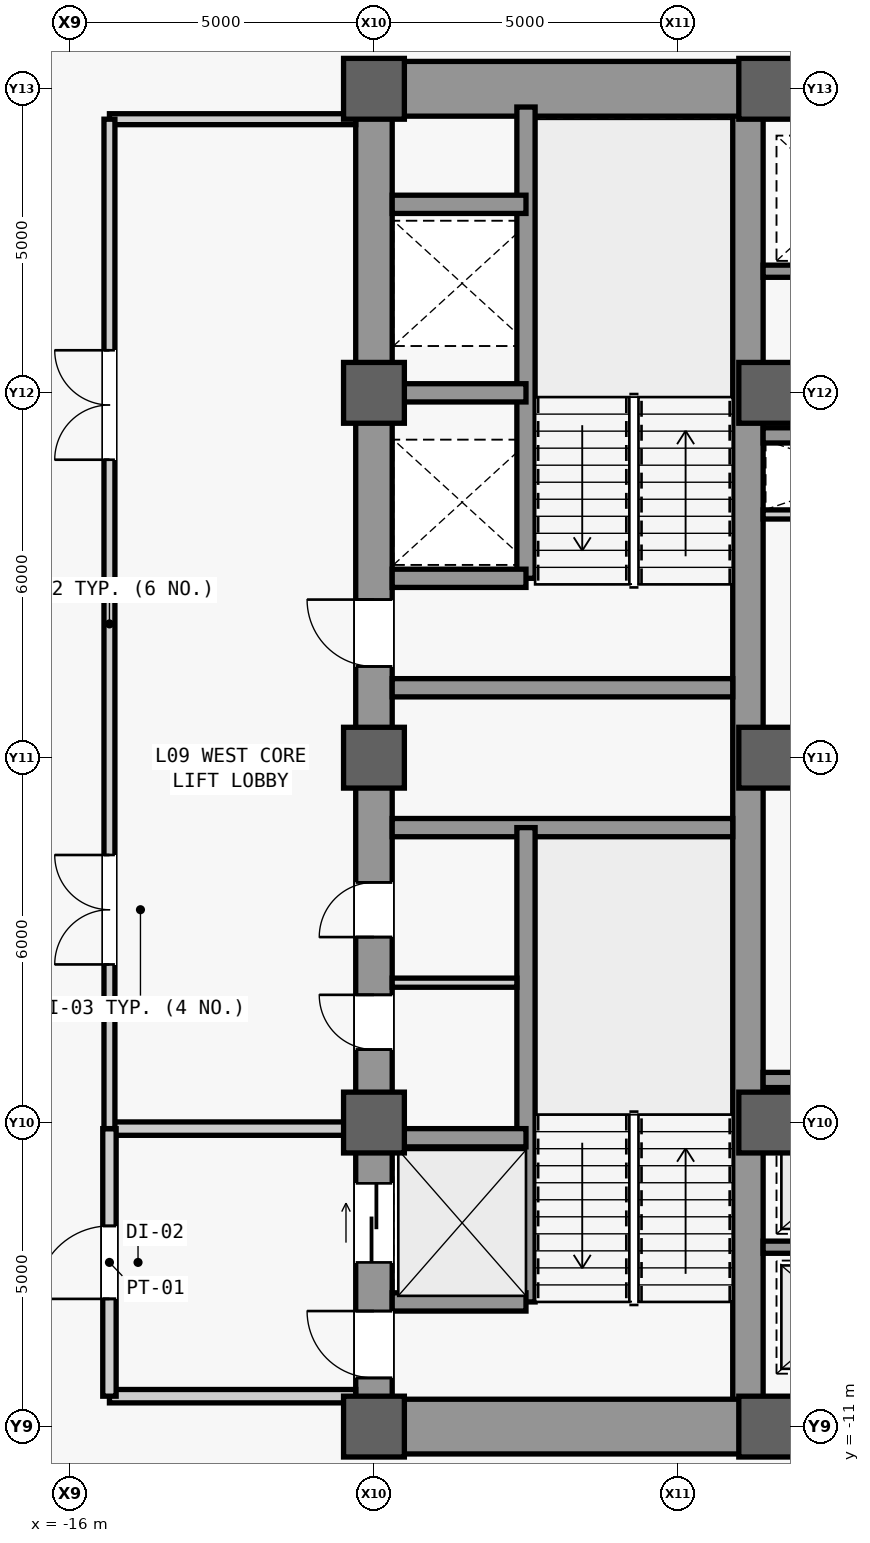
"""IFC4 building model, lengths in metres.
Left out: names, types, materials, properties, quantities, classifications, styles, units other than length and angle.
Written with IfcOpenShell. Run it as: python <this file> out.ifc"""

import sys

from ifc_helpers import new_model, si_unit, direction, frame, frame_2d, origin, origin_2d, place, context, subcontext, project, spatial, rectangle, extrude, source, transform, mapped, element, fill, save


model = new_model("IFC4")
c1 = context("Model", 3, precision=1e-05, world=origin(), true_north=direction((0.0, 1.0)))
c2 = subcontext(c1, "Body", "Model", "MODEL_VIEW")
j1 = project(units=[si_unit("LENGTHUNIT", "METRE"), si_unit("PLANEANGLEUNIT", "RADIAN")], contexts=[c1])
p1 = place(None, origin())
s1 = spatial("IfcSite", under=j1, at=p1, CompositionType="ELEMENT")
p2 = place(p1, origin())
s2 = spatial("IfcBuilding", under=s1, at=p2, CompositionType="ELEMENT")
p3 = place(p2, frame((0.0, 0.0, 45.2)))
s3 = spatial("IfcBuildingStorey", under=s2, at=p3, CompositionType="ELEMENT", Elevation=45.2)
m1 = source(origin(), c2, "Body", "SweptSolid", [
    extrude(rectangle(XDim=22.0, YDim=0.6, at=frame_2d((11.0, 0.0))), origin(), (0.0, 0.0, 1.0), 3.94),
])
p4 = place(p3, frame((-11.0, -11.0, 0.0), z_axis=(0.0, 0.0, 1.0), x_axis=(0.0, 1.0, 0.0)))
e1 = element("IfcWall", 1, at=p4, inside=s3, PredefinedType="SHEAR", context=c2, shape_type="MappedRepresentation", body=[
    mapped(m1, transform((0.0, 0.0, 0.0), scale=1.0)),
])
m2 = source(origin(), c2, "Body", "SweptSolid", [
    extrude(rectangle(XDim=1.1, YDim=2.2, at=frame_2d((0.55, 1.1))), frame((0.0, 0.31, 0.0), z_axis=(0.0, -1.0, 0.0), x_axis=(1.0, 0.0, 0.0)), (0.0, 0.0, 1.0), 0.62),
])
p5 = place(p4, frame((0.8, 0.0, 0.0)))
e2 = element("IfcOpeningElement", 2, at=p5, cuts=e1, PredefinedType="OPENING", context=c2, shape_type="MappedRepresentation", body=[
    mapped(m2, transform((0.0, 0.0, 0.0), scale=1.0)),
])
p6 = place(p4, frame((12.5, 0.0, 0.0)))
e3 = element("IfcOpeningElement", 3, at=p6, cuts=e1, PredefinedType="OPENING", context=c2, shape_type="MappedRepresentation", body=[
    mapped(m2, transform((0.0, 0.0, 0.0), scale=1.0)),
])
m3 = source(origin(), c2, "Body", "SweptSolid", [
    extrude(rectangle(XDim=0.9, YDim=2.15, at=frame_2d((0.45, 1.075))), frame((0.0, 0.31, 0.0), z_axis=(0.0, -1.0, 0.0), x_axis=(1.0, 0.0, 0.0)), (0.0, 0.0, 1.0), 0.62),
])
p7 = place(p4, frame((6.2, 0.0, 0.0)))
e4 = element("IfcOpeningElement", 4, at=p7, cuts=e1, PredefinedType="OPENING", context=c2, shape_type="MappedRepresentation", body=[
    mapped(m3, transform((0.0, 0.0, 0.0), scale=1.0)),
])
p8 = place(p4, frame((8.05, 0.0, 0.0)))
e5 = element("IfcOpeningElement", 5, at=p8, cuts=e1, PredefinedType="OPENING", context=c2, shape_type="MappedRepresentation", body=[
    mapped(m3, transform((0.0, 0.0, 0.0), scale=1.0)),
])
m4 = source(origin(), c2, "Body", "SweptSolid", [
    extrude(rectangle(XDim=1.3, YDim=2.3, at=frame_2d((0.65, 1.15))), frame((0.0, 0.31, 0.0), z_axis=(0.0, -1.0, 0.0), x_axis=(1.0, 0.0, 0.0)), (0.0, 0.0, 1.0), 0.62),
])
p9 = place(p4, frame((2.7, 0.0, 0.0)))
e6 = element("IfcOpeningElement", 6, at=p9, cuts=e1, PredefinedType="OPENING", context=c2, shape_type="MappedRepresentation", body=[
    mapped(m4, transform((0.0, 0.0, 0.0), scale=1.0)),
])
m5 = source(origin(), c2, "Body", "SweptSolid", [
    extrude(rectangle(XDim=21.4, YDim=0.5, at=frame_2d((10.7, 0.0))), origin(), (0.0, 0.0, 1.0), 3.94),
])
p10 = place(p3, frame((-4.85, -10.7, 0.0), z_axis=(0.0, 0.0, 1.0), x_axis=(0.0, 1.0, 0.0)))
e7 = element("IfcWall", 7, at=p10, inside=s3, PredefinedType="SHEAR", context=c2, shape_type="MappedRepresentation", body=[
    mapped(m5, transform((0.0, 0.0, 0.0), scale=1.0)),
])
m6 = source(origin(), c2, "Body", "SweptSolid", [
    extrude(rectangle(XDim=5.85, YDim=0.9, at=frame_2d((2.925, 0.0))), origin(), (0.0, 0.0, 1.0), 3.94),
])
for number, where, z_axis, x_axis in (
    (8, (-10.7, -11.0, 0.0), (0.0, 0.0, 1.0), (1.0, 0.0, 0.0)),
    (9, (-10.7, 11.0, 0.0), (0.0, 0.0, 1.0), (1.0, 0.0, 0.0)),
):
    element("IfcWall", number, at=place(p3, frame(where, z_axis=z_axis, x_axis=x_axis)), inside=s3, PredefinedType="SHEAR", context=c2, shape_type="MappedRepresentation", body=[
        mapped(m6, transform((0.0, 0.0, 0.0), scale=1.0)),
    ])
m7 = source(origin(), c2, "Body", "SweptSolid", [
    extrude(rectangle(XDim=5.6, YDim=0.3, at=frame_2d((2.8, 0.0))), origin(), (0.0, 0.0, 1.0), 3.94),
])
for number, where, z_axis, x_axis in (
    (10, (-10.7, -1.15, 0.0), (0.0, 0.0, 1.0), (1.0, 0.0, 0.0)),
    (11, (-10.7, 1.15, 0.0), (0.0, 0.0, 1.0), (1.0, 0.0, 0.0)),
):
    element("IfcWall", number, at=place(p3, frame(where, z_axis=z_axis, x_axis=x_axis)), inside=s3, PredefinedType="SHEAR", context=c2, shape_type="MappedRepresentation", body=[
        mapped(m7, transform((0.0, 0.0, 0.0), scale=1.0)),
    ])
m8 = source(origin(), c2, "Body", "SweptSolid", [
    extrude(rectangle(XDim=9.2, YDim=0.5, at=frame_2d((4.6, 0.0))), origin(), (0.0, 0.0, 1.0), 3.94),
])
p11 = place(p3, frame((-4.6, -11.0, 0.0), z_axis=(0.0, 0.0, 1.0), x_axis=(1.0, 0.0, 0.0)))
e12 = element("IfcWall", 12, at=p11, inside=s3, PredefinedType="SHEAR", context=c2, shape_type="MappedRepresentation", body=[
    mapped(m8, transform((0.0, 0.0, 0.0), scale=1.0)),
])
m9 = source(origin(), c2, "Body", "SweptSolid", [
    extrude(rectangle(XDim=1.8, YDim=2.25, at=frame_2d((0.9, 1.125))), frame((0.0, 0.26, 0.0), z_axis=(0.0, -1.0, 0.0), x_axis=(1.0, 0.0, 0.0)), (0.0, 0.0, 1.0), 0.52),
])
p12 = place(p11, frame((3.7, 0.0, 0.0)))
e13 = element("IfcOpeningElement", 13, at=p12, cuts=e12, PredefinedType="OPENING", context=c2, shape_type="MappedRepresentation", body=[
    mapped(m9, transform((0.0, 0.0, 0.0), scale=1.0)),
])
p13 = place(p3, frame((-4.6, 11.0, 0.0), z_axis=(0.0, 0.0, 1.0), x_axis=(1.0, 0.0, 0.0)))
e14 = element("IfcWall", 14, at=p13, inside=s3, PredefinedType="SHEAR", context=c2, shape_type="MappedRepresentation", body=[
    mapped(m8, transform((0.0, 0.0, 0.0), scale=1.0)),
])
p14 = place(p13, frame((3.7, 0.0, 0.0)))
e15 = element("IfcOpeningElement", 15, at=p14, cuts=e14, PredefinedType="OPENING", context=c2, shape_type="MappedRepresentation", body=[
    mapped(m9, transform((0.0, 0.0, 0.0), scale=1.0)),
])
m10 = source(origin(), c2, "Body", "SweptSolid", [
    extrude(rectangle(XDim=1.0, YDim=1.0, at=origin_2d()), origin(), (0.0, 0.0, 1.0), 4.2),
])
for number, where, z_axis, x_axis in (
    (16, (-11.0, -11.0, 0.0), (0.0, 0.0, 1.0), (1.0, 0.0, 0.0)),
    (17, (-11.0, -6.0, 0.0), (0.0, 0.0, 1.0), (1.0, 0.0, 0.0)),
    (18, (-11.0, 0.0, 0.0), (0.0, 0.0, 1.0), (1.0, 0.0, 0.0)),
    (19, (-11.0, 6.0, 0.0), (0.0, 0.0, 1.0), (1.0, 0.0, 0.0)),
    (20, (-11.0, 11.0, 0.0), (0.0, 0.0, 1.0), (1.0, 0.0, 0.0)),
    (21, (-4.5, -11.0, 0.0), (0.0, 0.0, 1.0), (1.0, 0.0, 0.0)),
    (22, (-4.5, -6.0, 0.0), (0.0, 0.0, 1.0), (1.0, 0.0, 0.0)),
    (23, (-4.5, 0.0, 0.0), (0.0, 0.0, 1.0), (1.0, 0.0, 0.0)),
    (24, (-4.5, 6.0, 0.0), (0.0, 0.0, 1.0), (1.0, 0.0, 0.0)),
    (25, (-4.5, 11.0, 0.0), (0.0, 0.0, 1.0), (1.0, 0.0, 0.0)),
):
    element("IfcColumn", number, at=place(p3, frame(where, z_axis=z_axis, x_axis=x_axis)), inside=s3, PredefinedType="COLUMN", context=c2, shape_type="MappedRepresentation", body=[
        mapped(m10, transform((0.0, 0.0, 0.0), scale=1.0)),
    ])
m11 = source(origin(), c2, "Body", "SweptSolid", [
    extrude(rectangle(XDim=7.8, YDim=0.3, at=frame_2d((3.9, 0.0))), origin(), (0.0, 0.0, 1.0), 3.94),
])
p15 = place(p3, frame((-8.5, -8.95, 0.0), z_axis=(0.0, 0.0, 1.0), x_axis=(0.0, 1.0, 0.0)))
e26 = element("IfcWall", 26, at=p15, inside=s3, PredefinedType="SHEAR", context=c2, shape_type="MappedRepresentation", body=[
    mapped(m11, transform((0.0, 0.0, 0.0), scale=1.0)),
])
m12 = source(origin(), c2, "Body", "SweptSolid", [
    extrude(rectangle(XDim=2.2, YDim=0.3, at=frame_2d((1.1, 0.0))), origin(), (0.0, 0.0, 1.0), 3.94),
])
for number, where, z_axis, x_axis in (
    (27, (-10.7, -8.95, 0.0), (0.0, 0.0, 1.0), (1.0, 0.0, 0.0)),
    (28, (-10.7, -6.25, 0.0), (0.0, 0.0, 1.0), (1.0, 0.0, 0.0)),
):
    element("IfcWall", number, at=place(p3, frame(where, z_axis=z_axis, x_axis=x_axis)), inside=s3, PredefinedType="SHEAR", context=c2, shape_type="MappedRepresentation", body=[
        mapped(m12, transform((0.0, 0.0, 0.0), scale=1.0)),
    ])
m13 = source(origin(), c2, "Body", "SweptSolid", [
    extrude(rectangle(XDim=7.75, YDim=0.3, at=frame_2d((3.875, 0.0))), origin(), (0.0, 0.0, 1.0), 3.94),
])
p16 = place(p3, frame((-8.5, 2.95, 0.0), z_axis=(0.0, 0.0, 1.0), x_axis=(0.0, 1.0, 0.0)))
e29 = element("IfcWall", 29, at=p16, inside=s3, PredefinedType="SHEAR", context=c2, shape_type="MappedRepresentation", body=[
    mapped(m13, transform((0.0, 0.0, 0.0), scale=1.0)),
])
for number, where, z_axis, x_axis in (
    (30, (-10.7, 2.95, 0.0), (0.0, 0.0, 1.0), (1.0, 0.0, 0.0)),
    (31, (-10.7, 6.0, 0.0), (0.0, 0.0, 1.0), (1.0, 0.0, 0.0)),
    (32, (-10.7, 9.1, 0.0), (0.0, 0.0, 1.0), (1.0, 0.0, 0.0)),
):
    element("IfcWall", number, at=place(p3, frame(where, z_axis=z_axis, x_axis=x_axis)), inside=s3, PredefinedType="SHEAR", context=c2, shape_type="MappedRepresentation", body=[
        mapped(m12, transform((0.0, 0.0, 0.0), scale=1.0)),
    ])
m14 = source(origin(), c2, "Body", "SweptSolid", [
    extrude(rectangle(XDim=2.05, YDim=0.15, at=frame_2d((1.025, 0.0))), origin(), (0.0, 0.0, 1.0), 3.94),
])
p17 = place(p3, frame((-10.7, -3.7, 0.0), z_axis=(0.0, 0.0, 1.0), x_axis=(1.0, 0.0, 0.0)))
e33 = element("IfcWall", 33, at=p17, inside=s3, PredefinedType="PARTITIONING", context=c2, shape_type="MappedRepresentation", body=[
    mapped(m14, transform((0.0, 0.0, 0.0), scale=1.0)),
])
m15 = source(origin(), c2, "Body", "SweptSolid", [
    extrude(rectangle(XDim=4.05, YDim=0.22, at=frame_2d((2.025, 0.0))), origin(), (0.0, 0.0, 1.0), 3.94),
])
p18 = place(p3, frame((-15.35, -10.5, 0.0), z_axis=(0.0, 0.0, 1.0), x_axis=(1.0, 0.0, 0.0)))
e34 = element("IfcWall", 34, at=p18, inside=s3, PredefinedType="PARTITIONING", context=c2, shape_type="MappedRepresentation", body=[
    mapped(m15, transform((0.0, 0.0, 0.0), scale=1.0)),
])
m16 = source(origin(), c2, "Body", "SweptSolid", [
    extrude(rectangle(XDim=4.05, YDim=0.22, at=frame_2d((2.025, 0.0))), origin(), (0.0, 0.0, 1.0), 3.085),
])
p19 = place(p3, frame((-15.35, -6.1, 0.0), z_axis=(0.0, 0.0, 1.0), x_axis=(1.0, 0.0, 0.0)))
e35 = element("IfcWall", 35, at=p19, inside=s3, PredefinedType="PARTITIONING", context=c2, shape_type="MappedRepresentation", body=[
    mapped(m16, transform((0.0, 0.0, 0.0), scale=1.0)),
])
m17 = source(origin(), c2, "Body", "SweptSolid", [
    extrude(rectangle(XDim=4.4, YDim=0.22, at=frame_2d((2.2, 0.0))), origin(), (0.0, 0.0, 1.0), 3.94),
])
p20 = place(p3, frame((-15.35, -10.5, 0.0), z_axis=(0.0, 0.0, 1.0), x_axis=(0.0, 1.0, 0.0)))
e36 = element("IfcWall", 36, at=p20, inside=s3, PredefinedType="PARTITIONING", context=c2, shape_type="MappedRepresentation", body=[
    mapped(m17, transform((0.0, 0.0, 0.0), scale=1.0)),
])
m18 = source(origin(), c2, "Body", "SweptSolid", [
    extrude(rectangle(XDim=1.2, YDim=2.2, at=frame_2d((0.6, 1.1))), frame((0.0, 0.12, 0.0), z_axis=(0.0, -1.0, 0.0), x_axis=(1.0, 0.0, 0.0)), (0.0, 0.0, 1.0), 0.24),
])
p21 = place(p20, frame((1.6, 0.0, 0.0)))
e37 = element("IfcOpeningElement", 37, at=p21, cuts=e36, PredefinedType="OPENING", context=c2, shape_type="MappedRepresentation", body=[
    mapped(m18, transform((0.0, 0.0, 0.0), scale=1.0)),
])
m19 = source(origin(), c2, "Body", "SweptSolid", [
    extrude(rectangle(XDim=4.05, YDim=0.18, at=frame_2d((2.025, 0.0))), origin(), (0.0, 0.0, 1.0), 3.94),
])
p22 = place(p3, frame((-15.35, 10.5, 0.0), z_axis=(0.0, 0.0, 1.0), x_axis=(1.0, 0.0, 0.0)))
e38 = element("IfcWall", 38, at=p22, inside=s3, PredefinedType="PARTITIONING", context=c2, shape_type="MappedRepresentation", body=[
    mapped(m19, transform((0.0, 0.0, 0.0), scale=1.0)),
])
m20 = source(origin(), c2, "Body", "SweptSolid", [
    extrude(rectangle(XDim=16.6, YDim=0.18, at=frame_2d((8.3, 0.0))), origin(), (0.0, 0.0, 1.0), 3.94),
])
p23 = place(p3, frame((-15.35, -6.1, 0.0), z_axis=(0.0, 0.0, 1.0), x_axis=(0.0, 1.0, 0.0)))
e39 = element("IfcWall", 39, at=p23, inside=s3, PredefinedType="PARTITIONING", context=c2, shape_type="MappedRepresentation", body=[
    mapped(m20, transform((0.0, 0.0, 0.0), scale=1.0)),
])
m21 = source(origin(), c2, "Body", "SweptSolid", [
    extrude(rectangle(XDim=1.8, YDim=2.25, at=frame_2d((0.9, 1.125))), frame((0.0, 0.1, 0.0), z_axis=(0.0, -1.0, 0.0), x_axis=(1.0, 0.0, 0.0)), (0.0, 0.0, 1.0), 0.2),
])
p24 = place(p23, frame((2.7, 0.0, 0.0)))
e40 = element("IfcOpeningElement", 40, at=p24, cuts=e39, PredefinedType="OPENING", context=c2, shape_type="MappedRepresentation", body=[
    mapped(m21, transform((0.0, 0.0, 0.0), scale=1.0)),
])
p25 = place(p23, frame((11.0, 0.0, 0.0)))
e41 = element("IfcOpeningElement", 41, at=p25, cuts=e39, PredefinedType="OPENING", context=c2, shape_type="MappedRepresentation", body=[
    mapped(m21, transform((0.0, 0.0, 0.0), scale=1.0)),
])
m22 = source(origin(), c2, "Body", "SweptSolid", [
    extrude(rectangle(XDim=3.45, YDim=0.15, at=frame_2d((1.725, 0.0))), origin(), (0.0, 0.0, 1.0), 3.94),
])
p26 = place(p3, frame((-4.6, 4.0, 0.0), z_axis=(0.0, 0.0, 1.0), x_axis=(1.0, 0.0, 0.0)))
e42 = element("IfcWall", 42, at=p26, inside=s3, PredefinedType="PARTITIONING", context=c2, shape_type="MappedRepresentation", body=[
    mapped(m22, transform((0.0, 0.0, 0.0), scale=1.0)),
])
m23 = source(origin(), c2, "Body", "SweptSolid", [
    extrude(rectangle(XDim=2.45, YDim=0.2, at=frame_2d((1.225, 0.0))), origin(), (0.0, 0.0, 1.0), 3.94),
])
p27 = place(p3, frame((-4.6, -8.05, 0.0), z_axis=(0.0, 0.0, 1.0), x_axis=(1.0, 0.0, 0.0)))
e43 = element("IfcWall", 43, at=p27, inside=s3, PredefinedType="SHEAR", context=c2, shape_type="MappedRepresentation", body=[
    mapped(m23, transform((0.0, 0.0, 0.0), scale=1.0)),
])
m24 = source(origin(), c2, "Body", "SweptSolid", [
    extrude(rectangle(XDim=9.2, YDim=0.25, at=frame_2d((4.6, 0.0))), origin(), (0.0, 0.0, 1.0), 3.94),
])
p28 = place(p3, frame((-4.6, -5.3, 0.0), z_axis=(0.0, 0.0, 1.0), x_axis=(1.0, 0.0, 0.0)))
e44 = element("IfcWall", 44, at=p28, inside=s3, PredefinedType="SHEAR", context=c2, shape_type="MappedRepresentation", body=[
    mapped(m24, transform((0.0, 0.0, 0.0), scale=1.0)),
])
m25 = source(origin(), c2, "Body", "SweptSolid", [
    extrude(rectangle(XDim=1.05, YDim=2.2, at=frame_2d((0.525, 1.1))), frame((0.0, 0.135, 0.0), z_axis=(0.0, -1.0, 0.0), x_axis=(1.0, 0.0, 0.0)), (0.0, 0.0, 1.0), 0.27),
])
p29 = place(p28, frame((4.075, 0.0, 0.0)))
e45 = element("IfcOpeningElement", 45, at=p29, cuts=e44, PredefinedType="OPENING", context=c2, shape_type="MappedRepresentation", body=[
    mapped(m25, transform((0.0, 0.0, 0.0), scale=1.0)),
])
p30 = place(p3, frame((-4.6, 8.0, 0.0), z_axis=(0.0, 0.0, 1.0), x_axis=(1.0, 0.0, 0.0)))
e46 = element("IfcWall", 46, at=p30, inside=s3, PredefinedType="SHEAR", context=c2, shape_type="MappedRepresentation", body=[
    mapped(m23, transform((0.0, 0.0, 0.0), scale=1.0)),
])
p31 = place(p3, frame((-4.6, 5.3, 0.0), z_axis=(0.0, 0.0, 1.0), x_axis=(1.0, 0.0, 0.0)))
e47 = element("IfcWall", 47, at=p31, inside=s3, PredefinedType="SHEAR", context=c2, shape_type="MappedRepresentation", body=[
    mapped(m24, transform((0.0, 0.0, 0.0), scale=1.0)),
])
p32 = place(p31, frame((4.075, 0.0, 0.0)))
e48 = element("IfcOpeningElement", 48, at=p32, cuts=e47, PredefinedType="OPENING", context=c2, shape_type="MappedRepresentation", body=[
    mapped(m25, transform((0.0, 0.0, 0.0), scale=1.0)),
])
m26 = source(origin(), c2, "Body", "SweptSolid", [
    extrude(rectangle(XDim=1.1, YDim=2.2, at=frame_2d((0.55, 1.1))), frame((0.0, 0.025, 0.0), z_axis=(0.0, -1.0, 0.0), x_axis=(1.0, 0.0, 0.0)), (0.0, 0.0, 1.0), 0.05),
])
p33 = place(p5, origin())
e49 = element("IfcDoor", 49, at=p33, inside=s3, OperationType="SINGLE_SWING_RIGHT", PredefinedType="DOOR", context=c2, shape_type="MappedRepresentation", body=[
    mapped(m26, transform((0.0, 0.0, 0.0), scale=1.0)),
])
fill(e2, e49)
p34 = place(p6, origin())
e50 = element("IfcDoor", 50, at=p34, inside=s3, OperationType="SINGLE_SWING_RIGHT", PredefinedType="DOOR", context=c2, shape_type="MappedRepresentation", body=[
    mapped(m26, transform((0.0, 0.0, 0.0), scale=1.0)),
])
fill(e3, e50)
m27 = source(origin(), c2, "Body", "SweptSolid", [
    extrude(rectangle(XDim=0.9, YDim=2.15, at=frame_2d((0.45, 1.075))), frame((0.0, 0.025, 0.0), z_axis=(0.0, -1.0, 0.0), x_axis=(1.0, 0.0, 0.0)), (0.0, 0.0, 1.0), 0.05),
])
p35 = place(p7, origin())
e51 = element("IfcDoor", 51, at=p35, inside=s3, OperationType="SINGLE_SWING_RIGHT", PredefinedType="DOOR", context=c2, shape_type="MappedRepresentation", body=[
    mapped(m27, transform((0.0, 0.0, 0.0), scale=1.0)),
])
fill(e4, e51)
p36 = place(p8, origin())
e52 = element("IfcDoor", 52, at=p36, inside=s3, OperationType="SINGLE_SWING_LEFT", PredefinedType="DOOR", context=c2, shape_type="MappedRepresentation", body=[
    mapped(m27, transform((0.0, 0.0, 0.0), scale=1.0)),
])
fill(e5, e52)
m28 = source(origin(), c2, "Body", "SweptSolid", [
    extrude(rectangle(XDim=1.2, YDim=2.2, at=frame_2d((0.6, 1.1))), frame((0.0, 0.025, 0.0), z_axis=(0.0, -1.0, 0.0), x_axis=(1.0, 0.0, 0.0)), (0.0, 0.0, 1.0), 0.05),
])
p37 = place(p21, origin())
e53 = element("IfcDoor", 53, at=p37, inside=s3, OperationType="SINGLE_SWING_LEFT", PredefinedType="DOOR", context=c2, shape_type="MappedRepresentation", body=[
    mapped(m28, transform((0.0, 0.0, 0.0), scale=1.0)),
])
fill(e37, e53)
m29 = source(origin(), c2, "Body", "SweptSolid", [
    extrude(rectangle(XDim=1.8, YDim=2.25, at=frame_2d((0.9, 1.125))), frame((0.0, 0.025, 0.0), z_axis=(0.0, -1.0, 0.0), x_axis=(1.0, 0.0, 0.0)), (0.0, 0.0, 1.0), 0.05),
])
p38 = place(p24, origin())
e54 = element("IfcDoor", 54, at=p38, inside=s3, OperationType="SINGLE_SWING_LEFT", PredefinedType="DOOR", context=c2, shape_type="MappedRepresentation", body=[
    mapped(m29, transform((0.0, 0.0, 0.0), scale=1.0)),
])
fill(e40, e54)
p39 = place(p25, origin())
e55 = element("IfcDoor", 55, at=p39, inside=s3, OperationType="SINGLE_SWING_RIGHT", PredefinedType="DOOR", context=c2, shape_type="MappedRepresentation", body=[
    mapped(m29, transform((0.0, 0.0, 0.0), scale=1.0)),
])
fill(e41, e55)
m30 = source(origin(), c2, "Body", "SweptSolid", [
    extrude(rectangle(XDim=1.3, YDim=2.3, at=frame_2d((0.65, 1.15))), frame((0.0, 0.025, 0.0), z_axis=(0.0, -1.0, 0.0), x_axis=(1.0, 0.0, 0.0)), (0.0, 0.0, 1.0), 0.05),
])
p40 = place(p9, origin())
e56 = element("IfcDoor", 56, at=p40, inside=s3, OperationType="SLIDING_TO_LEFT", PredefinedType="DOOR", context=c2, shape_type="MappedRepresentation", body=[
    mapped(m30, transform((0.0, 0.0, 0.0), scale=1.0)),
])
fill(e6, e56)
save(model, sys.argv[1])
